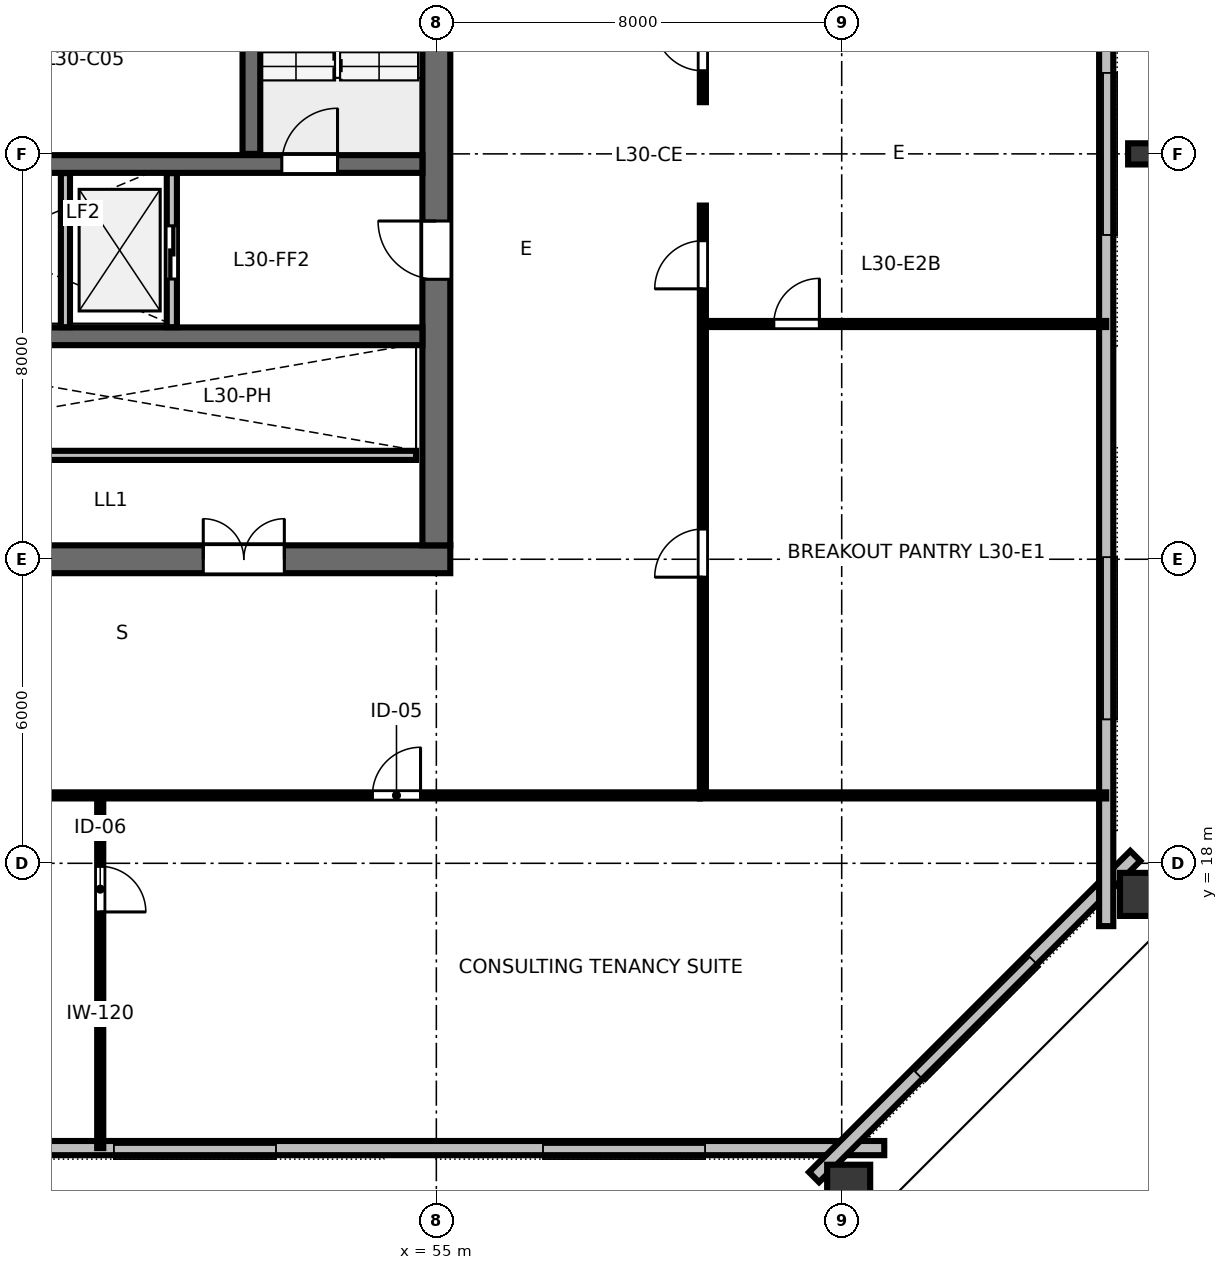
"""IFC4 building model, lengths in metres.
Left out: names, types, materials, properties, quantities, classifications, styles, units other than length and angle.
Written with IfcOpenShell. Run it as: python <this file> out.ifc"""

import sys

from ifc_helpers import new_model, si_unit, direction, frame, frame_2d, origin, origin_2d, place, context, subcontext, project, spatial, rectangle, hollow_rectangle, i_section, extrude, element, fill, save


model = new_model("IFC4")
c1 = context("Model", 3, precision=1e-05, world=origin(), true_north=direction((0.0, 1.0)))
c2 = subcontext(c1, "Body", "Model", "MODEL_VIEW")
j1 = project(units=[si_unit("LENGTHUNIT", "METRE"), si_unit("PLANEANGLEUNIT", "RADIAN")], contexts=[c1])
p1 = place(None, origin())
s1 = spatial("IfcSite", under=j1, at=p1, CompositionType="ELEMENT")
p2 = place(p1, origin())
s2 = spatial("IfcBuilding", under=s1, at=p2, CompositionType="ELEMENT")
p3 = place(p2, frame((0.0, 0.0, 116.8)))
s3 = spatial("IfcBuildingStorey", under=s2, at=p3, CompositionType="ELEMENT", Elevation=116.8)
p4 = place(p3, frame((36.725, 24.0, 0.0), z_axis=(0.0, 0.0, 1.0), x_axis=(1.0, 0.0, 0.0)))
e1 = element("IfcWall", 1, at=p4, inside=s3, PredefinedType="SHEAR", context=c2, shape_type="SweptSolid", body=[
    extrude(rectangle(XDim=18.55, YDim=0.55, at=frame_2d((9.275, 0.0))), origin(), (0.0, 0.0, 1.0), 3.36),
])
p5 = place(p4, frame((8.275, 0.0, 0.0)))
e2 = element("IfcOpeningElement", 2, at=p5, cuts=e1, PredefinedType="OPENING", context=c2, shape_type="SweptSolid", body=[
    extrude(rectangle(XDim=1.6, YDim=2.15, at=frame_2d((0.8, 1.075))), frame((0.0, 0.285, 0.0), z_axis=(0.0, -1.0, 0.0), x_axis=(1.0, 0.0, 0.0)), (0.0, 0.0, 1.0), 0.57),
])
p6 = place(p4, frame((13.675, 0.0, 0.0)))
e3 = element("IfcOpeningElement", 3, at=p6, cuts=e1, PredefinedType="OPENING", context=c2, shape_type="SweptSolid", body=[
    extrude(rectangle(XDim=1.6, YDim=2.15, at=frame_2d((0.8, 1.075))), frame((0.0, 0.285, 0.0), z_axis=(0.0, -1.0, 0.0), x_axis=(1.0, 0.0, 0.0)), (0.0, 0.0, 1.0), 0.57),
])
p7 = place(p3, frame((55.0, 24.275, 0.0), z_axis=(0.0, 0.0, 1.0), x_axis=(0.0, 1.0, 0.0)))
e4 = element("IfcWall", 4, at=p7, inside=s3, PredefinedType="SHEAR", context=c2, shape_type="SweptSolid", body=[
    extrude(rectangle(XDim=15.45, YDim=0.55, at=frame_2d((7.725, 0.0))), origin(), (0.0, 0.0, 1.0), 3.36),
])
p8 = place(p7, frame((5.25, 0.0, 0.0)))
e5 = element("IfcOpeningElement", 5, at=p8, cuts=e4, PredefinedType="OPENING", context=c2, shape_type="SweptSolid", body=[
    extrude(rectangle(XDim=1.15, YDim=2.15, at=frame_2d((0.575, 1.075))), frame((0.0, 0.285, 0.0), z_axis=(0.0, -1.0, 0.0), x_axis=(1.0, 0.0, 0.0)), (0.0, 0.0, 1.0), 0.57),
])
p9 = place(p3, frame((37.275, 31.8, 0.0), z_axis=(0.0, 0.0, 1.0), x_axis=(1.0, 0.0, 0.0)))
e6 = element("IfcWall", 6, at=p9, inside=s3, PredefinedType="SHEAR", context=c2, shape_type="SweptSolid", body=[
    extrude(rectangle(XDim=17.45, YDim=0.35, at=frame_2d((8.725, 0.0))), origin(), (0.0, 0.0, 1.0), 3.36),
])
p10 = place(p9, frame((0.775, 0.0, 0.0)))
e7 = element("IfcOpeningElement", 7, at=p10, cuts=e6, PredefinedType="OPENING", context=c2, shape_type="SweptSolid", body=[
    extrude(rectangle(XDim=1.1, YDim=2.15, at=frame_2d((0.55, 1.075))), frame((0.0, 0.185, 0.0), z_axis=(0.0, -1.0, 0.0), x_axis=(1.0, 0.0, 0.0)), (0.0, 0.0, 1.0), 0.37),
])
p11 = place(p9, frame((14.675, 0.0, 0.0)))
e8 = element("IfcOpeningElement", 8, at=p11, cuts=e6, PredefinedType="OPENING", context=c2, shape_type="SweptSolid", body=[
    extrude(rectangle(XDim=1.1, YDim=2.15, at=frame_2d((0.55, 1.075))), frame((0.0, 0.185, 0.0), z_axis=(0.0, -1.0, 0.0), x_axis=(1.0, 0.0, 0.0)), (0.0, 0.0, 1.0), 0.37),
])
p12 = place(p3, frame((37.275, 28.4, 0.0), z_axis=(0.0, 0.0, 1.0), x_axis=(1.0, 0.0, 0.0)))
e9 = element("IfcWall", 9, at=p12, inside=s3, PredefinedType="SHEAR", context=c2, shape_type="SweptSolid", body=[
    extrude(rectangle(XDim=17.45, YDim=0.35, at=frame_2d((8.725, 0.0))), origin(), (0.0, 0.0, 1.0), 3.36),
])
for number, where, z_axis, x_axis in (
    (10, (63.137, 11.552, 0.0), (0.0, 0.0, 1.0), (1.0, 0.0, 0.0)),
    (11, (68.992, 17.386, 0.0), (0.0, 0.0, 1.0), (0.0, 1.0, 0.0)),
):
    element("IfcColumn", number, at=place(p3, frame(where, z_axis=z_axis, x_axis=x_axis)), inside=s3, PredefinedType="COLUMN", context=c2, shape_type="SweptSolid", body=[
        extrude(hollow_rectangle(XDim=0.85, YDim=1.0, WallThickness=0.05, at=origin_2d()), origin(), (0.0, 0.0, 1.0), 3.358),
    ])
p13 = place(p3, frame((68.88, 32.0, 0.0), z_axis=(0.0, 0.0, 1.0), x_axis=(0.0, 1.0, 0.0)))
e12 = element("IfcColumn", 12, at=p13, inside=s3, PredefinedType="COLUMN", context=c2, shape_type="SweptSolid", body=[
    extrude(i_section(OverallWidth=0.418, OverallDepth=0.455, WebThickness=0.042, FlangeThickness=0.068, FilletRadius=0.025, at=origin_2d()), origin(), (0.0, 0.0, 1.0), 3.358),
])
p14 = place(p3, frame((28.16, 12.38, 0.0), z_axis=(0.0, 0.0, 1.0), x_axis=(1.0, 0.0, 0.0)))
e13 = element("IfcWall", 13, at=p14, inside=s3, PredefinedType="STANDARD", context=c2, shape_type="SweptSolid", body=[
    extrude(rectangle(XDim=35.68, YDim=0.28, at=frame_2d((17.84, 0.0))), origin(), (0.0, 0.0, 1.0), 3.36),
])
p15 = place(p3, frame((62.455, 11.806, 0.0), z_axis=(0.0, 0.0, 1.0), x_axis=(0.707106781187, 0.707106781187, 0.0)))
e14 = element("IfcWall", 14, at=p15, inside=s3, PredefinedType="STANDARD", context=c2, shape_type="SweptSolid", body=[
    extrude(rectangle(XDim=8.965, YDim=0.28, at=frame_2d((4.482, 0.0))), origin(), (0.0, 0.0, 1.0), 3.36),
])
p16 = place(p3, frame((68.22, 16.76, 0.0), z_axis=(0.0, 0.0, 1.0), x_axis=(0.0, 1.0, 0.0)))
e15 = element("IfcWall", 15, at=p16, inside=s3, PredefinedType="STANDARD", context=c2, shape_type="SweptSolid", body=[
    extrude(rectangle(XDim=30.48, YDim=0.28, at=frame_2d((15.24, 0.0))), origin(), (0.0, 0.0, 1.0), 3.36),
])
p17 = place(p3, frame((51.35, 32.0, 0.0), z_axis=(0.0, 0.0, 1.0), x_axis=(0.0, 1.0, 0.0)))
e16 = element("IfcWall", 16, at=p17, inside=s3, PredefinedType="SHEAR", context=c2, shape_type="SweptSolid", body=[
    extrude(rectangle(XDim=7.7, YDim=0.35, at=frame_2d((3.85, 0.0))), origin(), (0.0, 0.0, 1.0), 3.6),
])
p18 = place(p3, frame((49.78, 28.58, 0.0), z_axis=(0.0, 0.0, 1.0), x_axis=(0.0, 1.0, 0.0)))
e17 = element("IfcWall", 17, at=p18, inside=s3, PredefinedType="PARTITIONING", context=c2, shape_type="SweptSolid", body=[
    extrude(rectangle(XDim=3.04, YDim=0.2, at=frame_2d((1.52, 0.0))), origin(), (0.0, 0.0, 1.0), 3.36),
])
p19 = place(p18, frame((0.95, 0.0, 0.0)))
e18 = element("IfcOpeningElement", 18, at=p19, cuts=e17, PredefinedType="OPENING", context=c2, shape_type="SweptSolid", body=[
    extrude(rectangle(XDim=1.05, YDim=2.15, at=frame_2d((0.525, 1.075))), frame((0.0, 0.11, 0.0), z_axis=(0.0, -1.0, 0.0), x_axis=(1.0, 0.0, 0.0)), (0.0, 0.0, 1.0), 0.22),
])
p20 = place(p3, frame((47.68, 28.58, 0.0), z_axis=(0.0, 0.0, 1.0), x_axis=(0.0, 1.0, 0.0)))
e19 = element("IfcWall", 19, at=p20, inside=s3, PredefinedType="PARTITIONING", context=c2, shape_type="SweptSolid", body=[
    extrude(rectangle(XDim=3.04, YDim=0.18, at=frame_2d((1.52, 0.0))), origin(), (0.0, 0.0, 1.0), 3.36),
])
p21 = place(p3, frame((42.55, 26.05, 0.0), z_axis=(0.0, 0.0, 1.0), x_axis=(1.0, 0.0, 0.0)))
e20 = element("IfcWall", 20, at=p21, inside=s3, PredefinedType="PARTITIONING", context=c2, shape_type="SweptSolid", body=[
    extrude(rectangle(XDim=12.05, YDim=0.18, at=frame_2d((6.025, 0.0))), origin(), (0.0, 0.0, 1.0), 3.36),
])
p22 = place(p21, frame((1.1, 0.0, 0.0)))
e21 = element("IfcOpeningElement", 21, at=p22, cuts=e20, PredefinedType="OPENING", context=c2, shape_type="SweptSolid", body=[
    extrude(rectangle(XDim=1.05, YDim=2.15, at=frame_2d((0.525, 1.075))), frame((0.0, 0.1, 0.0), z_axis=(0.0, -1.0, 0.0), x_axis=(1.0, 0.0, 0.0)), (0.0, 0.0, 1.0), 0.2),
])
p23 = place(p21, frame((3.0, 0.0, 0.0)))
e22 = element("IfcOpeningElement", 22, at=p23, cuts=e20, PredefinedType="OPENING", context=c2, shape_type="SweptSolid", body=[
    extrude(rectangle(XDim=1.05, YDim=2.15, at=frame_2d((0.525, 1.075))), frame((0.0, 0.1, 0.0), z_axis=(0.0, -1.0, 0.0), x_axis=(1.0, 0.0, 0.0)), (0.0, 0.0, 1.0), 0.2),
])
p24 = place(p3, frame((48.366, 19.34, 0.0), z_axis=(0.0, 0.0, 1.0), x_axis=(0.0, -1.0, 0.0)))
e23 = element("IfcWall", 23, at=p24, inside=s3, PredefinedType="PARTITIONING", context=c2, shape_type="SweptSolid", body=[
    extrude(rectangle(XDim=6.96, YDim=0.12, at=frame_2d((3.48, 0.0))), origin(), (0.0, 0.0, 1.0), 2.64),
])
p25 = place(p24, frame((1.4, 0.0, 0.0)))
e24 = element("IfcOpeningElement", 24, at=p25, cuts=e23, PredefinedType="OPENING", context=c2, shape_type="SweptSolid", body=[
    extrude(rectangle(XDim=0.9, YDim=2.15, at=frame_2d((0.45, 1.075))), frame((0.0, 0.07, 0.0), z_axis=(0.0, -1.0, 0.0), x_axis=(1.0, 0.0, 0.0)), (0.0, 0.0, 1.0), 0.14),
])
p26 = place(p3, frame((31.8, 19.34, 0.0), z_axis=(0.0, 0.0, 1.0), x_axis=(1.0, 0.0, 0.0)))
e25 = element("IfcWall", 25, at=p26, inside=s3, PredefinedType="PARTITIONING", context=c2, shape_type="SweptSolid", body=[
    extrude(rectangle(XDim=28.4, YDim=0.12, at=frame_2d((14.2, 0.0))), origin(), (0.0, 0.0, 1.0), 2.64),
])
p27 = place(p26, frame((7.878, 0.0, 0.0)))
e26 = element("IfcOpeningElement", 26, at=p27, cuts=e25, PredefinedType="OPENING", context=c2, shape_type="SweptSolid", body=[
    extrude(rectangle(XDim=0.95, YDim=2.15, at=frame_2d((0.475, 1.075))), frame((0.0, 0.07, 0.0), z_axis=(0.0, -1.0, 0.0), x_axis=(1.0, 0.0, 0.0)), (0.0, 0.0, 1.0), 0.14),
])
p28 = place(p26, frame((21.938, 0.0, 0.0)))
e27 = element("IfcOpeningElement", 27, at=p28, cuts=e25, PredefinedType="OPENING", context=c2, shape_type="SweptSolid", body=[
    extrude(rectangle(XDim=0.95, YDim=2.15, at=frame_2d((0.475, 1.075))), frame((0.0, 0.07, 0.0), z_axis=(0.0, -1.0, 0.0), x_axis=(1.0, 0.0, 0.0)), (0.0, 0.0, 1.0), 0.14),
])
p29 = place(p3, frame((60.26, 28.643, 0.0), z_axis=(0.0, 0.0, 1.0), x_axis=(1.0, 0.0, 0.0)))
e28 = element("IfcWall", 28, at=p29, inside=s3, PredefinedType="PARTITIONING", context=c2, shape_type="SweptSolid", body=[
    extrude(rectangle(XDim=7.96, YDim=0.12, at=frame_2d((3.98, 0.0))), origin(), (0.0, 0.0, 1.0), 2.64),
])
p30 = place(p29, frame((1.4, 0.0, 0.0)))
e29 = element("IfcOpeningElement", 29, at=p30, cuts=e28, PredefinedType="OPENING", context=c2, shape_type="SweptSolid", body=[
    extrude(rectangle(XDim=0.9, YDim=2.15, at=frame_2d((0.45, 1.075))), frame((0.0, 0.07, 0.0), z_axis=(0.0, -1.0, 0.0), x_axis=(1.0, 0.0, 0.0)), (0.0, 0.0, 1.0), 0.14),
])
p31 = place(p3, frame((60.26, 19.4, 0.0), z_axis=(0.0, 0.0, 1.0), x_axis=(0.0, 1.0, 0.0)))
e30 = element("IfcWall", 30, at=p31, inside=s3, PredefinedType="PARTITIONING", context=c2, shape_type="SweptSolid", body=[
    extrude(rectangle(XDim=11.58, YDim=0.12, at=frame_2d((5.79, 0.0))), origin(), (0.0, 0.0, 1.0), 2.64),
])
p32 = place(p31, frame((4.246, 0.0, 0.0)))
e31 = element("IfcOpeningElement", 31, at=p32, cuts=e30, PredefinedType="OPENING", context=c2, shape_type="SweptSolid", body=[
    extrude(rectangle(XDim=0.95, YDim=2.15, at=frame_2d((0.475, 1.075))), frame((0.0, 0.07, 0.0), z_axis=(0.0, -1.0, 0.0), x_axis=(1.0, 0.0, 0.0)), (0.0, 0.0, 1.0), 0.14),
])
p33 = place(p31, frame((9.936, 0.0, 0.0)))
e32 = element("IfcOpeningElement", 32, at=p33, cuts=e30, PredefinedType="OPENING", context=c2, shape_type="SweptSolid", body=[
    extrude(rectangle(XDim=0.95, YDim=2.15, at=frame_2d((0.475, 1.075))), frame((0.0, 0.07, 0.0), z_axis=(0.0, -1.0, 0.0), x_axis=(1.0, 0.0, 0.0)), (0.0, 0.0, 1.0), 0.14),
])
p34 = place(p3, frame((60.26, 33.02, 0.0), z_axis=(0.0, 0.0, 1.0), x_axis=(0.0, 1.0, 0.0)))
e33 = element("IfcWall", 33, at=p34, inside=s3, PredefinedType="PARTITIONING", context=c2, shape_type="SweptSolid", body=[
    extrude(rectangle(XDim=11.58, YDim=0.12, at=frame_2d((5.79, 0.0))), origin(), (0.0, 0.0, 1.0), 2.64),
])
p35 = place(p34, frame((0.62, 0.0, 0.0)))
e34 = element("IfcOpeningElement", 34, at=p35, cuts=e33, PredefinedType="OPENING", context=c2, shape_type="SweptSolid", body=[
    extrude(rectangle(XDim=0.95, YDim=2.15, at=frame_2d((0.475, 1.075))), frame((0.0, 0.07, 0.0), z_axis=(0.0, -1.0, 0.0), x_axis=(1.0, 0.0, 0.0)), (0.0, 0.0, 1.0), 0.14),
])
p36 = place(p34, frame((6.31, 0.0, 0.0)))
e35 = element("IfcOpeningElement", 35, at=p36, cuts=e33, PredefinedType="OPENING", context=c2, shape_type="SweptSolid", body=[
    extrude(rectangle(XDim=0.95, YDim=2.15, at=frame_2d((0.475, 1.075))), frame((0.0, 0.07, 0.0), z_axis=(0.0, -1.0, 0.0), x_axis=(1.0, 0.0, 0.0)), (0.0, 0.0, 1.0), 0.14),
])
p37 = place(p3, frame((60.2, 19.34, 0.0), z_axis=(0.0, 0.0, 1.0), x_axis=(1.0, 0.0, 0.0)))
e36 = element("IfcWall", 36, at=p37, inside=s3, PredefinedType="PARTITIONING", context=c2, shape_type="SweptSolid", body=[
    extrude(rectangle(XDim=8.02, YDim=0.12, at=frame_2d((4.01, 0.0))), origin(), (0.0, 0.0, 1.0), 2.64),
])
p38 = place(p11, origin())
e37 = element("IfcDoor", 37, at=p38, inside=s3, OperationType="SINGLE_SWING_RIGHT", PredefinedType="DOOR", context=c2, shape_type="SweptSolid", body=[
    extrude(rectangle(XDim=1.1, YDim=2.15, at=frame_2d((0.55, 1.075))), frame((0.0, 0.025, 0.0), z_axis=(0.0, -1.0, 0.0), x_axis=(1.0, 0.0, 0.0)), (0.0, 0.0, 1.0), 0.05),
])
fill(e8, e37)
p39 = place(p8, origin())
e38 = element("IfcDoor", 38, at=p39, inside=s3, OperationType="SINGLE_SWING_RIGHT", PredefinedType="DOOR", context=c2, shape_type="SweptSolid", body=[
    extrude(rectangle(XDim=1.15, YDim=2.15, at=frame_2d((0.575, 1.075))), frame((0.0, 0.025, 0.0), z_axis=(0.0, -1.0, 0.0), x_axis=(1.0, 0.0, 0.0)), (0.0, 0.0, 1.0), 0.05),
])
fill(e5, e38)
p40 = place(p6, origin())
e39 = element("IfcDoor", 39, at=p40, inside=s3, OperationType="DOUBLE_DOOR_SINGLE_SWING", PredefinedType="DOOR", context=c2, shape_type="SweptSolid", body=[
    extrude(rectangle(XDim=1.6, YDim=2.15, at=frame_2d((0.8, 1.075))), frame((0.0, 0.025, 0.0), z_axis=(0.0, -1.0, 0.0), x_axis=(1.0, 0.0, 0.0)), (0.0, 0.0, 1.0), 0.05),
])
fill(e3, e39)
p41 = place(p19, origin())
e40 = element("IfcDoor", 40, at=p41, inside=s3, OperationType="SLIDING_TO_RIGHT", PredefinedType="DOOR", context=c2, shape_type="SweptSolid", body=[
    extrude(rectangle(XDim=1.05, YDim=2.15, at=frame_2d((0.525, 1.075))), frame((0.0, 0.025, 0.0), z_axis=(0.0, -1.0, 0.0), x_axis=(1.0, 0.0, 0.0)), (0.0, 0.0, 1.0), 0.05),
])
fill(e18, e40)
p42 = place(p25, origin())
e41 = element("IfcDoor", 41, at=p42, inside=s3, OperationType="SINGLE_SWING_RIGHT", PredefinedType="DOOR", context=c2, shape_type="SweptSolid", body=[
    extrude(rectangle(XDim=0.9, YDim=2.15, at=frame_2d((0.45, 1.075))), frame((0.0, 0.025, 0.0), z_axis=(0.0, -1.0, 0.0), x_axis=(1.0, 0.0, 0.0)), (0.0, 0.0, 1.0), 0.05),
])
fill(e24, e41)
p43 = place(p28, origin())
e42 = element("IfcDoor", 42, at=p43, inside=s3, OperationType="SINGLE_SWING_RIGHT", PredefinedType="DOOR", context=c2, shape_type="SweptSolid", body=[
    extrude(rectangle(XDim=0.95, YDim=2.15, at=frame_2d((0.475, 1.075))), frame((0.0, 0.025, 0.0), z_axis=(0.0, -1.0, 0.0), x_axis=(1.0, 0.0, 0.0)), (0.0, 0.0, 1.0), 0.05),
])
fill(e27, e42)
p44 = place(p30, origin())
e43 = element("IfcDoor", 43, at=p44, inside=s3, OperationType="SINGLE_SWING_RIGHT", PredefinedType="DOOR", context=c2, shape_type="SweptSolid", body=[
    extrude(rectangle(XDim=0.9, YDim=2.15, at=frame_2d((0.45, 1.075))), frame((0.0, 0.025, 0.0), z_axis=(0.0, -1.0, 0.0), x_axis=(1.0, 0.0, 0.0)), (0.0, 0.0, 1.0), 0.05),
])
fill(e29, e43)
p45 = place(p32, origin())
e44 = element("IfcDoor", 44, at=p45, inside=s3, OperationType="SINGLE_SWING_LEFT", PredefinedType="DOOR", context=c2, shape_type="SweptSolid", body=[
    extrude(rectangle(XDim=0.95, YDim=2.15, at=frame_2d((0.475, 1.075))), frame((0.0, 0.025, 0.0), z_axis=(0.0, -1.0, 0.0), x_axis=(1.0, 0.0, 0.0)), (0.0, 0.0, 1.0), 0.05),
])
fill(e31, e44)
p46 = place(p33, origin())
e45 = element("IfcDoor", 45, at=p46, inside=s3, OperationType="SINGLE_SWING_LEFT", PredefinedType="DOOR", context=c2, shape_type="SweptSolid", body=[
    extrude(rectangle(XDim=0.95, YDim=2.15, at=frame_2d((0.475, 1.075))), frame((0.0, 0.025, 0.0), z_axis=(0.0, -1.0, 0.0), x_axis=(1.0, 0.0, 0.0)), (0.0, 0.0, 1.0), 0.05),
])
fill(e32, e45)
p47 = place(p35, origin())
e46 = element("IfcDoor", 46, at=p47, inside=s3, OperationType="SINGLE_SWING_RIGHT", PredefinedType="DOOR", context=c2, shape_type="SweptSolid", body=[
    extrude(rectangle(XDim=0.95, YDim=2.15, at=frame_2d((0.475, 1.075))), frame((0.0, 0.025, 0.0), z_axis=(0.0, -1.0, 0.0), x_axis=(1.0, 0.0, 0.0)), (0.0, 0.0, 1.0), 0.05),
])
fill(e34, e46)
save(model, sys.argv[1])
